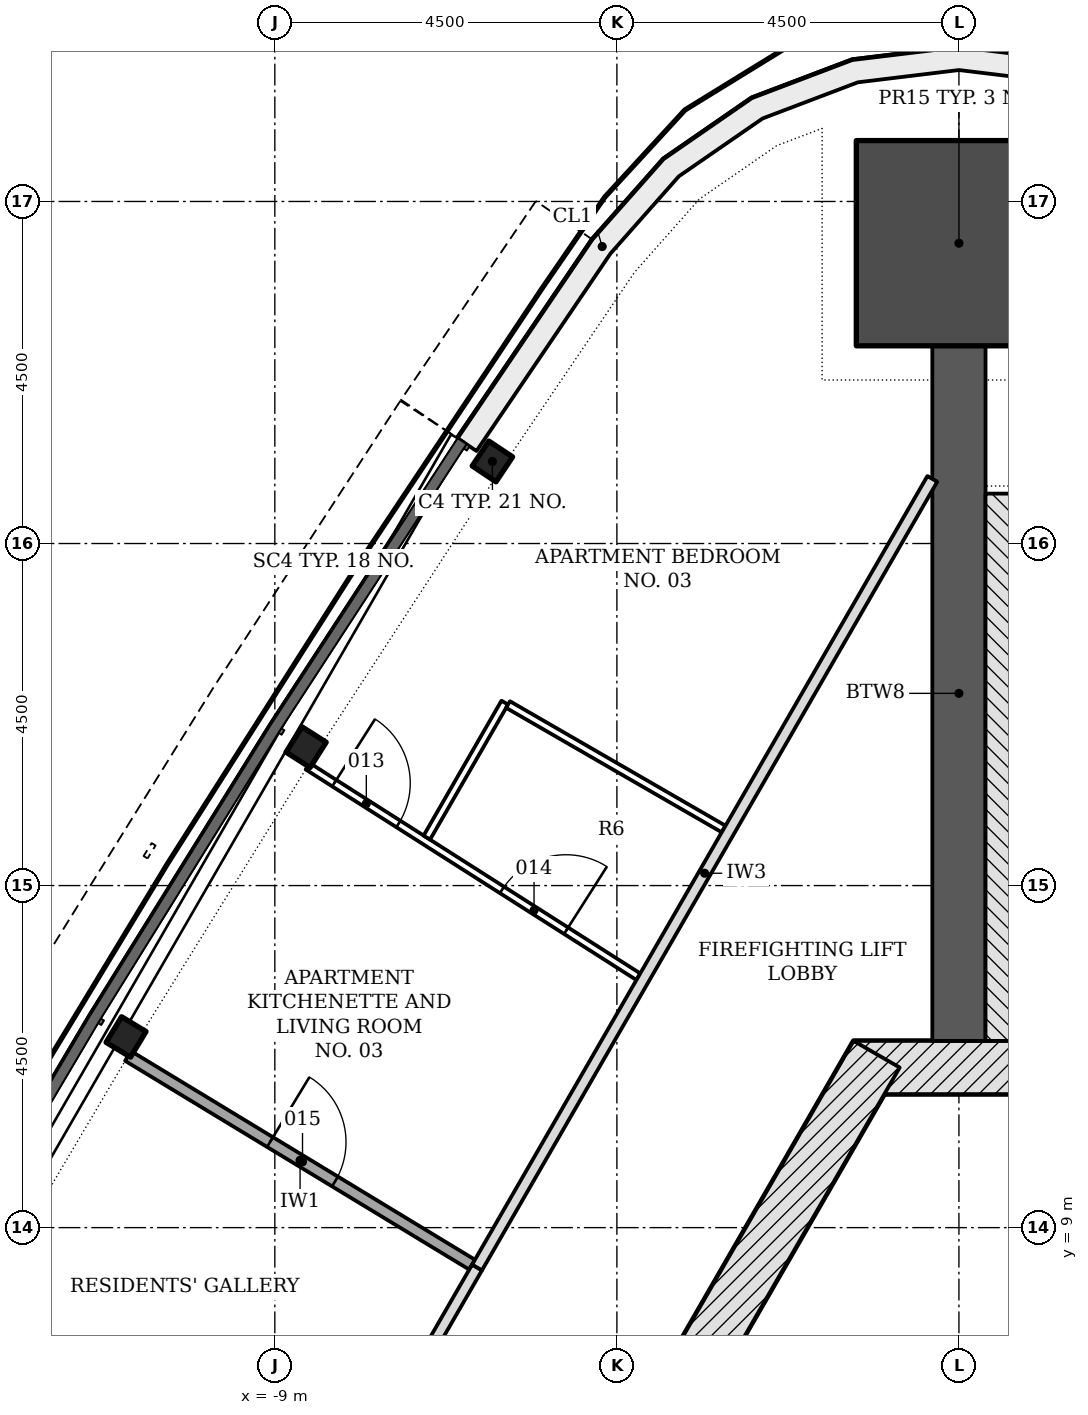
"""IFC4 building model, lengths in metres.
Left out: names, types, materials, properties, quantities, classifications, styles, units other than length and angle.
Written with IfcOpenShell. Run it as: python <this file> out.ifc"""

import sys

from ifc_helpers import new_model, si_unit, direction, frame, frame_2d, origin, origin_2d, place, context, subcontext, project, spatial, polyline, rectangle, i_section, outline, extrude, element, fill, save


model = new_model("IFC4")
c1 = context("Model", 3, precision=1e-05, world=origin(), true_north=direction((0.0, 1.0)))
c2 = subcontext(c1, "Body", "Model", "MODEL_VIEW")
j1 = project(units=[si_unit("LENGTHUNIT", "METRE"), si_unit("PLANEANGLEUNIT", "RADIAN")], contexts=[c1])
p1 = place(None, origin())
s1 = spatial("IfcSite", under=j1, at=p1, CompositionType="ELEMENT")
p2 = place(p1, origin())
s2 = spatial("IfcBuilding", under=s1, at=p2, CompositionType="ELEMENT")
p3 = place(p2, frame((0.0, 0.0, 192.3)))
s3 = spatial("IfcBuildingStorey", under=s2, at=p3, CompositionType="ELEMENT", Elevation=192.3)
p4 = place(p3, frame((1.386, 11.106, -0.2), z_axis=(0.0, 0.0, 1.0), x_axis=(-1.0, 0.0, 0.0)))
e1 = element("IfcWall", 1, at=p4, inside=s3, PredefinedType="SHEAR", context=c2, shape_type="SweptSolid", body=[
    extrude(rectangle(XDim=2.771, YDim=0.7, at=frame_2d((1.386, 0.0))), origin(), (0.0, 0.0, 1.0), 3.6),
])
p5 = place(p3, frame((-1.083, 11.281, -0.2), z_axis=(0.0, 0.0, 1.0), x_axis=(-0.500001446645, -0.866024568562, 0.0)))
e2 = element("IfcWall", 2, at=p5, inside=s3, PredefinedType="SHEAR", context=c2, shape_type="SweptSolid", body=[
    extrude(rectangle(XDim=18.458, YDim=0.7, at=frame_2d((9.229, 0.0))), origin(), (0.0, 0.0, 1.0), 3.6),
])
p6 = place(p5, frame((8.979, 0.0, 0.2)))
e3 = element("IfcOpeningElement", 3, at=p6, cuts=e2, PredefinedType="OPENING", context=c2, shape_type="SweptSolid", body=[
    extrude(rectangle(XDim=1.2, YDim=2.1, at=frame_2d((0.6, 1.05))), frame((0.0, 0.36, 0.0), z_axis=(0.0, -1.0, 0.0), x_axis=(1.0, 0.0, 0.0)), (0.0, 0.0, 1.0), 0.72),
])
p7 = place(p5, frame((11.029, 0.0, 0.2)))
e4 = element("IfcOpeningElement", 4, at=p7, cuts=e2, PredefinedType="OPENING", context=c2, shape_type="SweptSolid", body=[
    extrude(rectangle(XDim=1.2, YDim=2.1, at=frame_2d((0.6, 1.05))), frame((0.0, 0.36, 0.0), z_axis=(0.0, -1.0, 0.0), x_axis=(1.0, 0.0, 0.0)), (0.0, 0.0, 1.0), 0.72),
])
p8 = place(p3, frame((0.0, 11.456, -0.2), z_axis=(0.0, 0.0, 1.0), x_axis=(0.0, 1.0, 0.0)))
e5 = element("IfcWall", 5, at=p8, inside=s3, PredefinedType="SHEAR", context=c2, shape_type="SweptSolid", body=[
    extrude(rectangle(XDim=9.145, YDim=0.7, at=frame_2d((4.572, 0.0))), origin(), (0.0, 0.0, 1.0), 3.6),
])
p9 = place(p3, frame((0.0, 21.951, -0.2), z_axis=(0.0, 0.0, 1.0), x_axis=(0.0, 1.0, 0.0)))
e6 = element("IfcColumn", 6, at=p9, inside=s3, PredefinedType="COLUMN", context=c2, shape_type="SweptSolid", body=[
    extrude(rectangle(XDim=2.7, YDim=2.7, at=origin_2d()), origin(), (0.0, 0.0, 1.0), 3.6),
])
for number, where, z_axis, x_axis in (
    (7, (-6.138, 19.08, -0.2), (0.0, 0.0, 1.0), (-0.555, -0.832, 0.0)),
    (8, (-8.589, 15.32, -0.2), (0.0, 0.0, 1.0), (-0.537, -0.844, 0.0)),
    (9, (-10.958, 11.508, -0.2), (0.0, 0.0, 1.0), (-0.519, -0.855, 0.0)),
):
    element("IfcColumn", number, at=place(p3, frame(where, z_axis=z_axis, x_axis=x_axis)), inside=s3, PredefinedType="COLUMN", context=c2, shape_type="SweptSolid", body=[
        extrude(i_section(OverallWidth=0.394, OverallDepth=0.376, WebThickness=0.017, FlangeThickness=0.028, FilletRadius=0.015, at=origin_2d()), origin(), (0.0, 0.0, 1.0), 3.6),
    ])
p10 = place(p3, origin())
e10 = element("IfcWall", 10, at=p10, inside=s3, PredefinedType="NOTDEFINED", context=c2, shape_type="SweptSolid", body=[
    extrude(outline(polyline([(6.595, 19.385), (4.822, 21.999), (3.885, 23.057), (2.723, 23.86), (1.402, 24.361), (0.0, 24.531), (-1.402, 24.361), (-2.723, 23.86), (-3.885, 23.057), (-4.822, 21.999), (-6.595, 19.385), (-6.347, 19.217), (-4.584, 21.815), (-3.685, 22.831), (-2.583, 23.592), (-1.33, 24.067), (0.0, 24.229), (1.33, 24.067), (2.583, 23.592), (3.685, 22.831), (4.584, 21.815), (6.347, 19.217), (6.595, 19.385)])), origin(), (0.0, 0.0, 1.0), 3.3),
])
p11 = place(p3, frame((2.706, 7.769, -0.2), z_axis=(0.0, 0.0, 1.0), x_axis=(-0.866022959057, -0.500004234368, 0.0)))
e11 = element("IfcWall", 11, at=p11, inside=s3, PredefinedType="PARTITIONING", context=c2, shape_type="SweptSolid", body=[
    extrude(rectangle(XDim=2.5, YDim=0.25, at=frame_2d((1.25, 0.0))), origin(), (0.0, 0.0, 1.0), 3.6),
])
p12 = place(p3, frame((0.968, 11.456, -0.2), z_axis=(0.0, 0.0, 1.0), x_axis=(0.0, 1.0, 0.0)))
e12 = element("IfcWall", 12, at=p12, inside=s3, PredefinedType="SHEAR", context=c2, shape_type="SweptSolid", body=[
    extrude(rectangle(XDim=7.2, YDim=1.236, at=frame_2d((3.6, 0.0))), origin(), (0.0, 0.0, 1.0), 3.6),
])
p13 = place(p3, frame((-0.35, 18.85, 0.0), z_axis=(0.0, 0.0, 1.0), x_axis=(-0.500000553364, -0.866025084299, 0.0)))
e13 = element("IfcWall", 13, at=p13, inside=s3, PredefinedType="PARTITIONING", context=c2, shape_type="SweptSolid", body=[
    extrude(rectangle(XDim=11.981, YDim=0.15, at=frame_2d((5.991, 0.0))), origin(), (0.0, 0.0, 1.0), 2.852),
])
p14 = place(p3, frame((-10.931, 11.258, 0.0), z_axis=(0.0, 0.0, 1.0), x_axis=(0.855021240233, -0.51859297985, 0.0)))
e14 = element("IfcWall", 14, at=p14, inside=s3, PredefinedType="PARTITIONING", context=c2, shape_type="SweptSolid", body=[
    extrude(rectangle(XDim=5.294, YDim=0.15, at=frame_2d((2.647, 0.0))), origin(), (0.0, 0.0, 1.0), 3.4),
])
p15 = place(p14, frame((2.184, 0.0, 0.0)))
e15 = element("IfcOpeningElement", 15, at=p15, cuts=e14, PredefinedType="OPENING", context=c2, shape_type="SweptSolid", body=[
    extrude(rectangle(XDim=1.0, YDim=2.1, at=frame_2d((0.5, 1.05))), frame((0.0, 0.085, 0.0), z_axis=(0.0, -1.0, 0.0), x_axis=(1.0, 0.0, 0.0)), (0.0, 0.0, 1.0), 0.17),
])
p16 = place(p3, frame((-6.341, 8.474, 0.0), z_axis=(0.0, 0.0, 1.0), x_axis=(-0.49999822179, -0.866026430432, 0.0)))
e16 = element("IfcWall", 16, at=p16, inside=s3, PredefinedType="PARTITIONING", context=c2, shape_type="SweptSolid", body=[
    extrude(rectangle(XDim=4.368, YDim=0.15, at=frame_2d((2.184, 0.0))), origin(), (0.0, 0.0, 1.0), 2.852),
])
p17 = place(p16, frame((1.684, 0.0, 0.0)))
e17 = element("IfcOpeningElement", 17, at=p17, cuts=e16, PredefinedType="OPENING", context=c2, shape_type="SweptSolid", body=[
    extrude(rectangle(XDim=1.0, YDim=2.1, at=frame_2d((0.5, 1.05))), frame((0.0, 0.085, 0.0), z_axis=(0.0, -1.0, 0.0), x_axis=(1.0, 0.0, 0.0)), (0.0, 0.0, 1.0), 0.17),
])
p18 = place(p3, frame((-8.568, 15.07, 0.0), z_axis=(0.0, 0.0, 1.0), x_axis=(0.843577645789, -0.537007221111, 0.0)))
e18 = element("IfcWall", 18, at=p18, inside=s3, PredefinedType="PARTITIONING", context=c2, shape_type="SweptSolid", body=[
    extrude(rectangle(XDim=5.156, YDim=0.1, at=frame_2d((2.578, 0.0))), origin(), (0.0, 0.0, 1.0), 3.4),
])
p19 = place(p18, frame((0.414, 0.0, 0.0)))
e19 = element("IfcOpeningElement", 19, at=p19, cuts=e18, PredefinedType="OPENING", context=c2, shape_type="SweptSolid", body=[
    extrude(rectangle(XDim=1.0, YDim=2.1, at=frame_2d((0.5, 1.05))), frame((0.0, 0.06, 0.0), z_axis=(0.0, -1.0, 0.0), x_axis=(1.0, 0.0, 0.0)), (0.0, 0.0, 1.0), 0.12),
])
p20 = place(p18, frame((3.03, 0.0, 0.0)))
e20 = element("IfcOpeningElement", 20, at=p20, cuts=e18, PredefinedType="OPENING", context=c2, shape_type="SweptSolid", body=[
    extrude(rectangle(XDim=1.0, YDim=2.1, at=frame_2d((0.5, 1.05))), frame((0.0, 0.06, 0.0), z_axis=(0.0, -1.0, 0.0), x_axis=(1.0, 0.0, 0.0)), (0.0, 0.0, 1.0), 0.12),
])
p21 = place(p3, frame((-7.0, 14.131, 0.0), z_axis=(0.0, 0.0, 1.0), x_axis=(0.500045446624, 0.865999163574, 0.0)))
e21 = element("IfcWall", 21, at=p21, inside=s3, PredefinedType="PARTITIONING", context=c2, shape_type="SweptSolid", body=[
    extrude(rectangle(XDim=2.05, YDim=0.1, at=frame_2d((1.025, 0.0))), origin(), (0.0, 0.0, 1.0), 2.852),
])
p22 = place(p3, frame((-5.932, 15.882, 0.0), z_axis=(0.0, 0.0, 1.0), x_axis=(0.866027924134, -0.499995634601, 0.0)))
e22 = element("IfcWall", 22, at=p22, inside=s3, PredefinedType="PARTITIONING", context=c2, shape_type="SweptSolid", body=[
    extrude(rectangle(XDim=3.275, YDim=0.1, at=frame_2d((1.637, 0.0))), origin(), (0.0, 0.0, 1.0), 3.4),
])
p23 = place(p19, origin())
e23 = element("IfcDoor", 23, at=p23, inside=s3, OperationType="SINGLE_SWING_LEFT", PredefinedType="DOOR", context=c2, shape_type="SweptSolid", body=[
    extrude(rectangle(XDim=1.0, YDim=2.1, at=frame_2d((0.5, 1.05))), frame((0.0, 0.025, 0.0), z_axis=(0.0, -1.0, 0.0), x_axis=(1.0, 0.0, 0.0)), (0.0, 0.0, 1.0), 0.05),
])
fill(e19, e23)
p24 = place(p20, origin())
e24 = element("IfcDoor", 24, at=p24, inside=s3, OperationType="SINGLE_SWING_RIGHT", PredefinedType="DOOR", context=c2, shape_type="SweptSolid", body=[
    extrude(rectangle(XDim=1.0, YDim=2.1, at=frame_2d((0.5, 1.05))), frame((0.0, 0.025, 0.0), z_axis=(0.0, -1.0, 0.0), x_axis=(1.0, 0.0, 0.0)), (0.0, 0.0, 1.0), 0.05),
])
fill(e20, e24)
p25 = place(p15, origin())
e25 = element("IfcDoor", 25, at=p25, inside=s3, OperationType="SINGLE_SWING_LEFT", PredefinedType="DOOR", context=c2, shape_type="SweptSolid", body=[
    extrude(rectangle(XDim=1.0, YDim=2.1, at=frame_2d((0.5, 1.05))), frame((0.0, 0.025, 0.0), z_axis=(0.0, -1.0, 0.0), x_axis=(1.0, 0.0, 0.0)), (0.0, 0.0, 1.0), 0.05),
])
fill(e15, e25)
save(model, sys.argv[1])
